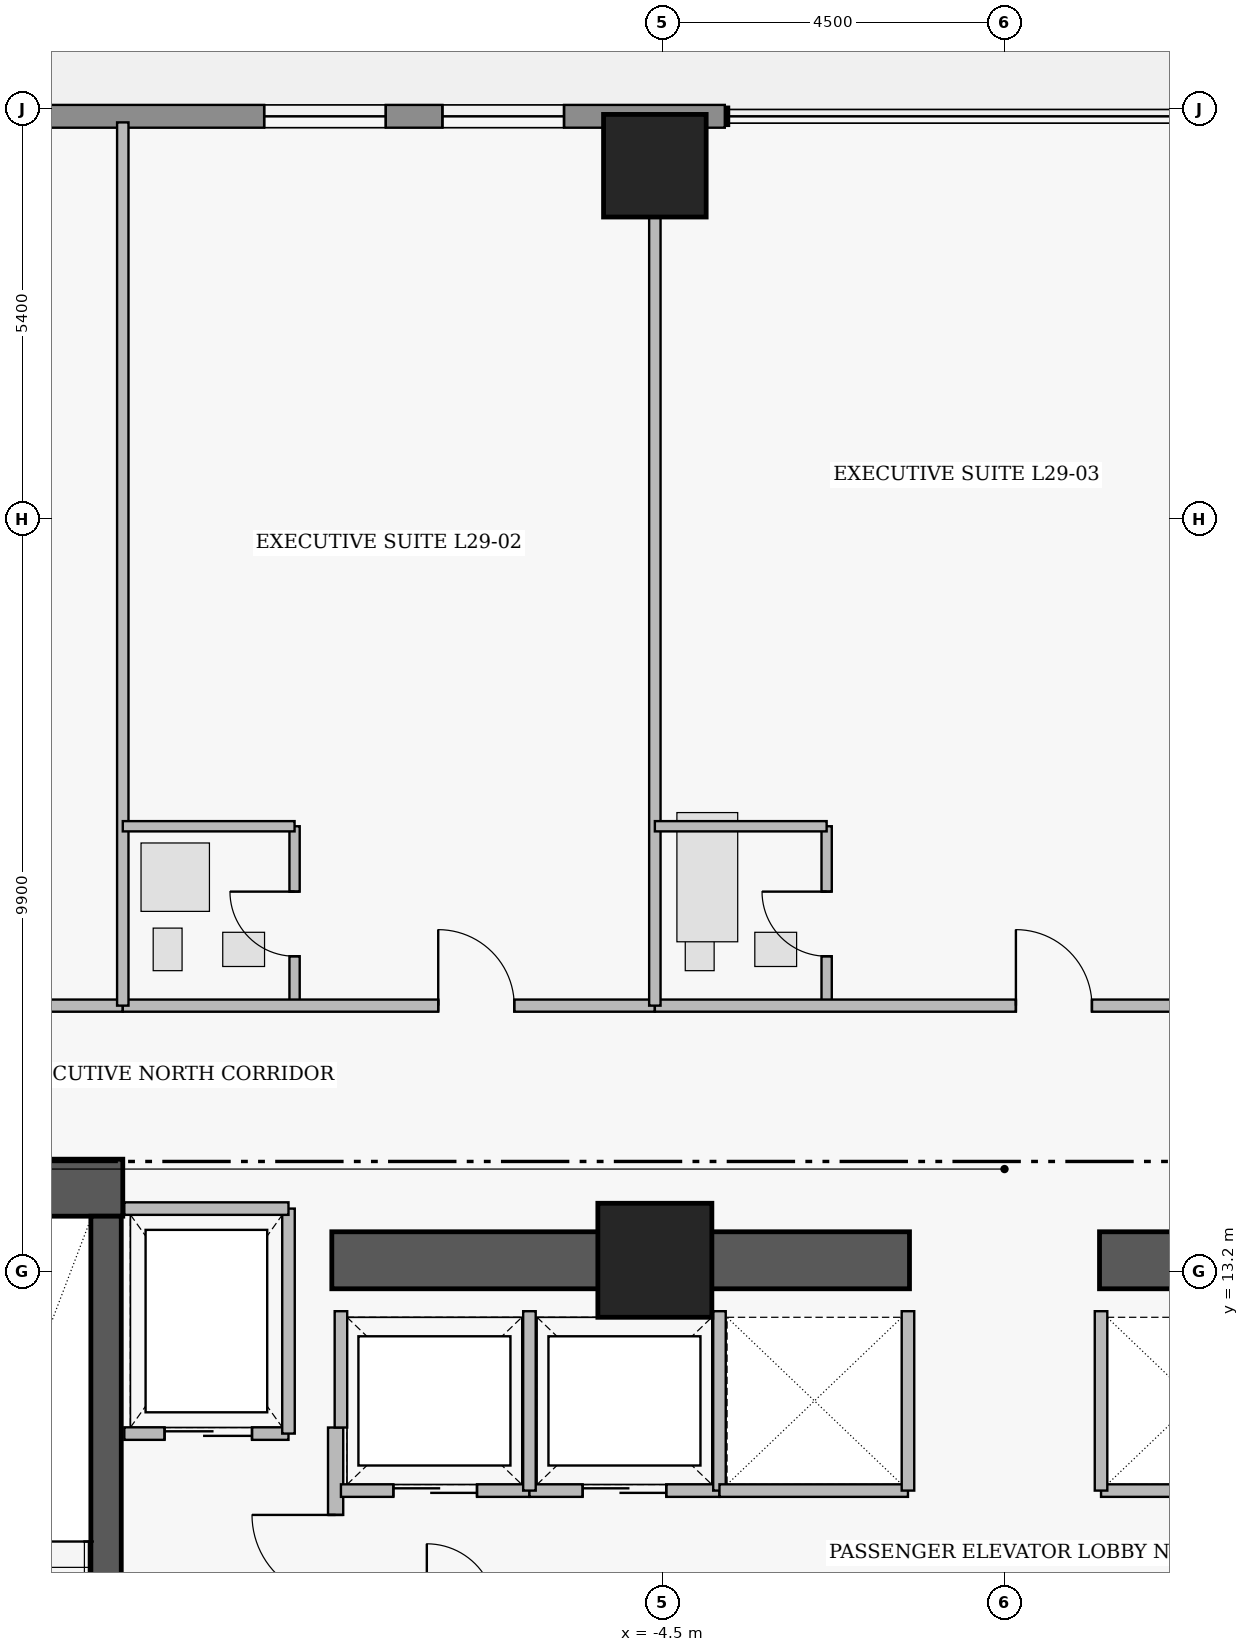
"""IFC4 building model, lengths in metres.
Left out: names, types, materials, properties, quantities, classifications, styles, units other than length and angle.
Written with IfcOpenShell. Run it as: python <this file> out.ifc"""

import sys

from ifc_helpers import new_model, si_unit, direction, frame, frame_2d, origin, origin_2d, place, context, subcontext, project, spatial, rectangle, extrude, element, fill, save


model = new_model("IFC4")
c1 = context("Model", 3, precision=1e-05, world=origin(), true_north=direction((0.0, 1.0)))
c2 = subcontext(c1, "Body", "Model", "MODEL_VIEW")
j1 = project(units=[si_unit("LENGTHUNIT", "METRE"), si_unit("PLANEANGLEUNIT", "RADIAN")], contexts=[c1])
p1 = place(None, origin())
s1 = spatial("IfcSite", under=j1, at=p1, CompositionType="ELEMENT")
p2 = place(p1, origin())
s2 = spatial("IfcBuilding", under=s1, at=p2, CompositionType="ELEMENT")
p3 = place(p2, frame((0.0, 0.0, 117.55)))
s3 = spatial("IfcBuildingStorey", under=s2, at=p3, CompositionType="ELEMENT", Elevation=117.55)
p4 = place(p3, frame((-16.16, 14.305, 0.0), z_axis=(0.0, 0.0, 1.0), x_axis=(1.0, 0.0, 0.0)))
e1 = element("IfcWall", 1, at=p4, inside=s3, PredefinedType="SHEAR", context=c2, shape_type="SweptSolid", body=[
    extrude(rectangle(XDim=4.56, YDim=0.75, at=frame_2d((2.28, 0.0))), origin(), (0.0, 0.0, 1.0), 3.46),
])
for number, where, z_axis, x_axis in (
    (2, (-8.85, 13.35, 0.0), (0.0, 0.0, 1.0), (1.0, 0.0, 0.0)),
    (3, (1.25, 13.35, 0.0), (0.0, 0.0, 1.0), (1.0, 0.0, 0.0)),
):
    element("IfcWall", number, at=place(p3, frame(where, z_axis=z_axis, x_axis=x_axis)), inside=s3, PredefinedType="SHEAR", context=c2, shape_type="SweptSolid", body=[
        extrude(rectangle(XDim=7.6, YDim=0.75, at=frame_2d((3.8, 0.0))), origin(), (0.0, 0.0, 1.0), 3.43),
    ])
p5 = place(p3, frame((-11.82, 4.97, 0.0), z_axis=(0.0, 0.0, 1.0), x_axis=(0.0, 1.0, 0.0)))
e4 = element("IfcWall", 4, at=p5, inside=s3, PredefinedType="SHEAR", context=c2, shape_type="SweptSolid", body=[
    extrude(rectangle(XDim=8.96, YDim=0.4, at=frame_2d((4.48, 0.0))), origin(), (0.0, 0.0, 1.0), 3.46),
])
p6 = place(p5, frame((0.31, 0.0, 0.0)))
e5 = element("IfcOpeningElement", 5, at=p6, cuts=e4, PredefinedType="OPENING", context=c2, shape_type="SweptSolid", body=[
    extrude(rectangle(XDim=1.12, YDim=2.22, at=frame_2d((0.56, 1.11))), frame((0.0, 0.21, 0.0), z_axis=(0.0, -1.0, 0.0), x_axis=(1.0, 0.0, 0.0)), (0.0, 0.0, 1.0), 0.42),
])
p7 = place(p3, frame((-4.6, 13.35, 0.0), z_axis=(0.0, 0.0, 1.0), x_axis=(1.0, 0.0, 0.0)))
e6 = element("IfcColumn", 6, at=p7, inside=s3, PredefinedType="COLUMN", context=c2, shape_type="SweptSolid", body=[
    extrude(rectangle(XDim=1.5, YDim=1.5, at=origin_2d()), origin(), (0.0, 0.0, 1.0), 3.65),
])
p8 = place(p3, frame((-4.6, 27.75, 0.0), z_axis=(0.0, 0.0, 1.0), x_axis=(1.0, 0.0, 0.0)))
e7 = element("IfcColumn", 7, at=p8, inside=s3, PredefinedType="COLUMN", context=c2, shape_type="SweptSolid", body=[
    extrude(rectangle(XDim=1.35, YDim=1.35, at=origin_2d()), origin(), (0.0, 0.0, 1.0), 3.65),
])
p9 = place(p3, frame((-14.72, 28.4, 0.0), z_axis=(0.0, 0.0, 1.0), x_axis=(1.0, 0.0, 0.0)))
e8 = element("IfcWall", 8, at=p9, inside=s3, PredefinedType="STANDARD", context=c2, shape_type="SweptSolid", body=[
    extrude(rectangle(XDim=11.04, YDim=0.3, at=frame_2d((5.52, 0.0))), origin(), (0.0, 0.0, 1.0), 3.43),
])
p10 = place(p9, frame((4.98, 0.0, 0.85)))
e9 = element("IfcOpeningElement", 9, at=p10, cuts=e8, PredefinedType="OPENING", context=c2, shape_type="SweptSolid", body=[
    extrude(rectangle(XDim=1.6, YDim=1.8, at=frame_2d((0.8, 0.9))), frame((0.0, 0.16, 0.0), z_axis=(0.0, -1.0, 0.0), x_axis=(1.0, 0.0, 0.0)), (0.0, 0.0, 1.0), 0.32),
])
p11 = place(p9, frame((7.325, 0.0, 0.85)))
e10 = element("IfcOpeningElement", 10, at=p11, cuts=e8, PredefinedType="OPENING", context=c2, shape_type="SweptSolid", body=[
    extrude(rectangle(XDim=1.6, YDim=1.8, at=frame_2d((0.8, 0.9))), frame((0.0, 0.16, 0.0), z_axis=(0.0, -1.0, 0.0), x_axis=(1.0, 0.0, 0.0)), (0.0, 0.0, 1.0), 0.32),
])
p12 = place(p3, frame((-8.8, 5.05, 0.0), z_axis=(0.0, 0.0, 1.0), x_axis=(0.0, 1.0, 0.0)))
e11 = element("IfcWall", 11, at=p12, inside=s3, PredefinedType="PARTITIONING", context=c2, shape_type="SweptSolid", body=[
    extrude(rectangle(XDim=6.1, YDim=0.2, at=frame_2d((3.05, 0.0))), origin(), (0.0, 0.0, 1.0), 3.43),
])
p13 = place(p12, frame((0.25, 0.0, 0.0)))
e12 = element("IfcOpeningElement", 12, at=p13, cuts=e11, PredefinedType="OPENING", context=c2, shape_type="SweptSolid", body=[
    extrude(rectangle(XDim=1.1, YDim=2.2, at=frame_2d((0.55, 1.1))), frame((0.0, 0.11, 0.0), z_axis=(0.0, -1.0, 0.0), x_axis=(1.0, 0.0, 0.0)), (0.0, 0.0, 1.0), 0.22),
])
p14 = place(p12, frame((3.85, 0.0, 0.0)))
e13 = element("IfcOpeningElement", 13, at=p14, cuts=e11, PredefinedType="OPENING", context=c2, shape_type="SweptSolid", body=[
    extrude(rectangle(XDim=1.1, YDim=2.2, at=frame_2d((0.55, 1.1))), frame((0.0, 0.11, 0.0), z_axis=(0.0, -1.0, 0.0), x_axis=(1.0, 0.0, 0.0)), (0.0, 0.0, 1.0), 0.22),
])
p15 = place(p3, frame((-11.58, 11.07, 0.0), z_axis=(0.0, 0.0, 1.0), x_axis=(1.0, 0.0, 0.0)))
e14 = element("IfcWall", 14, at=p15, inside=s3, PredefinedType="PARTITIONING", context=c2, shape_type="SweptSolid", body=[
    extrude(rectangle(XDim=2.16, YDim=0.165, at=frame_2d((1.08, 0.0))), origin(), (0.0, 0.0, 1.0), 3.43),
])
p16 = place(p15, frame((0.53, 0.0, 0.0)))
e15 = element("IfcOpeningElement", 15, at=p16, cuts=e14, PredefinedType="OPENING", context=c2, shape_type="SweptSolid", body=[
    extrude(rectangle(XDim=1.15, YDim=2.25, at=frame_2d((0.575, 1.125))), frame((0.0, 0.093, 0.0), z_axis=(0.0, -1.0, 0.0), x_axis=(1.0, 0.0, 0.0)), (0.0, 0.0, 1.0), 0.185),
])
p17 = place(p3, frame((-8.73, 10.32, 0.0), z_axis=(0.0, 0.0, 1.0), x_axis=(1.0, 0.0, 0.0)))
e16 = element("IfcWall", 16, at=p17, inside=s3, PredefinedType="PARTITIONING", context=c2, shape_type="SweptSolid", body=[
    extrude(rectangle(XDim=2.48, YDim=0.165, at=frame_2d((1.24, 0.0))), origin(), (0.0, 0.0, 1.0), 3.43),
])
p18 = place(p17, frame((0.69, 0.0, 0.0)))
e17 = element("IfcOpeningElement", 17, at=p18, cuts=e16, PredefinedType="OPENING", context=c2, shape_type="SweptSolid", body=[
    extrude(rectangle(XDim=1.1, YDim=2.25, at=frame_2d((0.55, 1.125))), frame((0.0, 0.093, 0.0), z_axis=(0.0, -1.0, 0.0), x_axis=(1.0, 0.0, 0.0)), (0.0, 0.0, 1.0), 0.185),
])
p19 = place(p3, frame((-6.25, 10.32, 0.0), z_axis=(0.0, 0.0, 1.0), x_axis=(1.0, 0.0, 0.0)))
e18 = element("IfcWall", 18, at=p19, inside=s3, PredefinedType="PARTITIONING", context=c2, shape_type="SweptSolid", body=[
    extrude(rectangle(XDim=2.5, YDim=0.165, at=frame_2d((1.25, 0.0))), origin(), (0.0, 0.0, 1.0), 3.43),
])
p20 = place(p19, frame((0.7, 0.0, 0.0)))
e19 = element("IfcOpeningElement", 19, at=p20, cuts=e18, PredefinedType="OPENING", context=c2, shape_type="SweptSolid", body=[
    extrude(rectangle(XDim=1.1, YDim=2.25, at=frame_2d((0.55, 1.125))), frame((0.0, 0.093, 0.0), z_axis=(0.0, -1.0, 0.0), x_axis=(1.0, 0.0, 0.0)), (0.0, 0.0, 1.0), 0.185),
])
p21 = place(p3, frame((-20.6, 16.7, 0.0), z_axis=(0.0, 0.0, 1.0), x_axis=(1.0, 0.0, 0.0)))
e20 = element("IfcWall", 20, at=p21, inside=s3, PredefinedType="PARTITIONING", context=c2, shape_type="SweptSolid", body=[
    extrude(rectangle(XDim=9.0, YDim=0.16, at=frame_2d((4.5, 0.0))), origin(), (0.0, 0.0, 1.0), 2.973),
])
p22 = place(p21, frame((5.15, 0.0, 0.0)))
e21 = element("IfcOpeningElement", 21, at=p22, cuts=e20, PredefinedType="OPENING", context=c2, shape_type="SweptSolid", body=[
    extrude(rectangle(XDim=1.0, YDim=2.15, at=frame_2d((0.5, 1.075))), frame((0.0, 0.09, 0.0), z_axis=(0.0, -1.0, 0.0), x_axis=(1.0, 0.0, 0.0)), (0.0, 0.0, 1.0), 0.18),
])
p23 = place(p3, frame((-9.34, 16.7, 0.0), z_axis=(0.0, 0.0, 1.0), x_axis=(0.0, 1.0, 0.0)))
e22 = element("IfcWall", 22, at=p23, inside=s3, PredefinedType="PLUMBINGWALL", context=c2, shape_type="SweptSolid", body=[
    extrude(rectangle(XDim=2.36, YDim=0.135, at=frame_2d((1.18, 0.0))), origin(), (0.0, 0.0, 1.0), 3.43),
])
p24 = place(p23, frame((0.65, 0.0, 0.0)))
e23 = element("IfcOpeningElement", 23, at=p24, cuts=e22, PredefinedType="OPENING", context=c2, shape_type="SweptSolid", body=[
    extrude(rectangle(XDim=0.85, YDim=2.1, at=frame_2d((0.425, 1.05))), frame((0.0, 0.077, 0.0), z_axis=(0.0, -1.0, 0.0), x_axis=(1.0, 0.0, 0.0)), (0.0, 0.0, 1.0), 0.155),
])
p25 = place(p3, frame((-11.6, 16.7, 0.0), z_axis=(0.0, 0.0, 1.0), x_axis=(1.0, 0.0, 0.0)))
e24 = element("IfcWall", 24, at=p25, inside=s3, PredefinedType="PARTITIONING", context=c2, shape_type="SweptSolid", body=[
    extrude(rectangle(XDim=7.0, YDim=0.16, at=frame_2d((3.5, 0.0))), origin(), (0.0, 0.0, 1.0), 2.973),
])
p26 = place(p25, frame((4.15, 0.0, 0.0)))
e25 = element("IfcOpeningElement", 25, at=p26, cuts=e24, PredefinedType="OPENING", context=c2, shape_type="SweptSolid", body=[
    extrude(rectangle(XDim=1.0, YDim=2.15, at=frame_2d((0.5, 1.075))), frame((0.0, 0.09, 0.0), z_axis=(0.0, -1.0, 0.0), x_axis=(1.0, 0.0, 0.0)), (0.0, 0.0, 1.0), 0.18),
])
p27 = place(p3, frame((-2.34, 16.7, 0.0), z_axis=(0.0, 0.0, 1.0), x_axis=(0.0, 1.0, 0.0)))
e26 = element("IfcWall", 26, at=p27, inside=s3, PredefinedType="PLUMBINGWALL", context=c2, shape_type="SweptSolid", body=[
    extrude(rectangle(XDim=2.36, YDim=0.135, at=frame_2d((1.18, 0.0))), origin(), (0.0, 0.0, 1.0), 3.43),
])
p28 = place(p27, frame((0.65, 0.0, 0.0)))
e27 = element("IfcOpeningElement", 27, at=p28, cuts=e26, PredefinedType="OPENING", context=c2, shape_type="SweptSolid", body=[
    extrude(rectangle(XDim=0.85, YDim=2.1, at=frame_2d((0.425, 1.05))), frame((0.0, 0.077, 0.0), z_axis=(0.0, -1.0, 0.0), x_axis=(1.0, 0.0, 0.0)), (0.0, 0.0, 1.0), 0.155),
])
p29 = place(p3, frame((-4.6, 16.7, 0.0), z_axis=(0.0, 0.0, 1.0), x_axis=(1.0, 0.0, 0.0)))
e28 = element("IfcWall", 28, at=p29, inside=s3, PredefinedType="PARTITIONING", context=c2, shape_type="SweptSolid", body=[
    extrude(rectangle(XDim=8.2, YDim=0.16, at=frame_2d((4.1, 0.0))), origin(), (0.0, 0.0, 1.0), 2.973),
])
p30 = place(p29, frame((4.75, 0.0, 0.0)))
e29 = element("IfcOpeningElement", 29, at=p30, cuts=e28, PredefinedType="OPENING", context=c2, shape_type="SweptSolid", body=[
    extrude(rectangle(XDim=1.0, YDim=2.15, at=frame_2d((0.5, 1.075))), frame((0.0, 0.09, 0.0), z_axis=(0.0, -1.0, 0.0), x_axis=(1.0, 0.0, 0.0)), (0.0, 0.0, 1.0), 0.18),
])
p31 = place(p3, frame((-9.42, 11.07, 0.0), z_axis=(0.0, 0.0, 1.0), x_axis=(0.0, 1.0, 0.0)))
e30 = element("IfcWall", 30, at=p31, inside=s3, PredefinedType="PARTITIONING", context=c2, shape_type="SweptSolid", body=[
    extrude(rectangle(XDim=2.96, YDim=0.165, at=frame_2d((1.48, 0.0))), origin(), (0.0, 0.0, 1.0), 3.43),
])
p32 = place(p3, frame((-11.58, 14.03, 0.0), z_axis=(0.0, 0.0, 1.0), x_axis=(1.0, 0.0, 0.0)))
e31 = element("IfcWall", 31, at=p32, inside=s3, PredefinedType="PARTITIONING", context=c2, shape_type="SweptSolid", body=[
    extrude(rectangle(XDim=2.16, YDim=0.165, at=frame_2d((1.08, 0.0))), origin(), (0.0, 0.0, 1.0), 3.43),
])
p33 = place(p3, frame((-8.73, 11.15, 0.0), z_axis=(0.0, 0.0, 1.0), x_axis=(0.0, 1.0, 0.0)))
e32 = element("IfcWall", 32, at=p33, inside=s3, PredefinedType="PARTITIONING", context=c2, shape_type="SweptSolid", body=[
    extrude(rectangle(XDim=1.53, YDim=0.165, at=frame_2d((0.765, 0.0))), origin(), (0.0, 0.0, 1.0), 3.43),
])
for number, where, z_axis, x_axis in (
    (33, (-6.25, 10.32, 0.0), (0.0, 0.0, 1.0), (0.0, 1.0, 0.0)),
    (34, (-3.75, 10.32, 0.0), (0.0, 0.0, 1.0), (0.0, 1.0, 0.0)),
):
    element("IfcWall", number, at=place(p3, frame(where, z_axis=z_axis, x_axis=x_axis)), inside=s3, PredefinedType="PARTITIONING", context=c2, shape_type="SweptSolid", body=[
        extrude(rectangle(XDim=2.36, YDim=0.165, at=frame_2d((1.18, 0.0))), origin(), (0.0, 0.0, 1.0), 3.43),
    ])
p34 = place(p3, frame((-3.75, 10.32, 0.0), z_axis=(0.0, 0.0, 1.0), x_axis=(1.0, 0.0, 0.0)))
e35 = element("IfcWall", 35, at=p34, inside=s3, PredefinedType="PARTITIONING", context=c2, shape_type="SweptSolid", body=[
    extrude(rectangle(XDim=2.48, YDim=0.165, at=frame_2d((1.24, 0.0))), origin(), (0.0, 0.0, 1.0), 3.43),
])
p35 = place(p3, frame((-1.27, 10.32, 0.0), z_axis=(0.0, 0.0, 1.0), x_axis=(0.0, 1.0, 0.0)))
e36 = element("IfcWall", 36, at=p35, inside=s3, PredefinedType="PARTITIONING", context=c2, shape_type="SweptSolid", body=[
    extrude(rectangle(XDim=2.36, YDim=0.165, at=frame_2d((1.18, 0.0))), origin(), (0.0, 0.0, 1.0), 3.43),
])
p36 = place(p3, frame((1.27, 10.32, 0.0), z_axis=(0.0, 0.0, 1.0), x_axis=(1.0, 0.0, 0.0)))
e37 = element("IfcWall", 37, at=p36, inside=s3, PredefinedType="PARTITIONING", context=c2, shape_type="SweptSolid", body=[
    extrude(rectangle(XDim=2.48, YDim=0.165, at=frame_2d((1.24, 0.0))), origin(), (0.0, 0.0, 1.0), 3.43),
])
p37 = place(p3, frame((1.27, 10.32, 0.0), z_axis=(0.0, 0.0, 1.0), x_axis=(0.0, 1.0, 0.0)))
e38 = element("IfcWall", 38, at=p37, inside=s3, PredefinedType="PARTITIONING", context=c2, shape_type="SweptSolid", body=[
    extrude(rectangle(XDim=2.36, YDim=0.165, at=frame_2d((1.18, 0.0))), origin(), (0.0, 0.0, 1.0), 3.43),
])
p38 = place(p3, frame((-11.6, 16.7, 0.0), z_axis=(0.0, 0.0, 1.0), x_axis=(0.0, 1.0, 0.0)))
e39 = element("IfcWall", 39, at=p38, inside=s3, PredefinedType="PARTITIONING", context=c2, shape_type="SweptSolid", body=[
    extrude(rectangle(XDim=11.62, YDim=0.15, at=frame_2d((5.81, 0.0))), origin(), (0.0, 0.0, 1.0), 3.43),
])
p39 = place(p3, frame((-11.6, 19.06, 0.0), z_axis=(0.0, 0.0, 1.0), x_axis=(1.0, 0.0, 0.0)))
e40 = element("IfcWall", 40, at=p39, inside=s3, PredefinedType="PLUMBINGWALL", context=c2, shape_type="SweptSolid", body=[
    extrude(rectangle(XDim=2.26, YDim=0.135, at=frame_2d((1.13, 0.0))), origin(), (0.0, 0.0, 1.0), 2.973),
])
p40 = place(p3, frame((-4.6, 16.7, 0.0), z_axis=(0.0, 0.0, 1.0), x_axis=(0.0, 1.0, 0.0)))
e41 = element("IfcWall", 41, at=p40, inside=s3, PredefinedType="PARTITIONING", context=c2, shape_type="SweptSolid", body=[
    extrude(rectangle(XDim=11.62, YDim=0.15, at=frame_2d((5.81, 0.0))), origin(), (0.0, 0.0, 1.0), 2.503),
])
p41 = place(p3, frame((-4.6, 19.06, 0.0), z_axis=(0.0, 0.0, 1.0), x_axis=(1.0, 0.0, 0.0)))
e42 = element("IfcWall", 42, at=p41, inside=s3, PredefinedType="PLUMBINGWALL", context=c2, shape_type="SweptSolid", body=[
    extrude(rectangle(XDim=2.26, YDim=0.135, at=frame_2d((1.13, 0.0))), origin(), (0.0, 0.0, 1.0), 2.973),
])
p42 = place(p10, origin())
e43 = element("IfcWindow", 43, at=p42, inside=s3, PartitioningType="SINGLE_PANEL", PredefinedType="WINDOW", context=c2, shape_type="SweptSolid", body=[
    extrude(rectangle(XDim=1.6, YDim=1.8, at=frame_2d((0.8, 0.9))), frame((0.0, 0.03, 0.0), z_axis=(0.0, -1.0, 0.0), x_axis=(1.0, 0.0, 0.0)), (0.0, 0.0, 1.0), 0.06),
])
fill(e9, e43)
p43 = place(p11, origin())
e44 = element("IfcWindow", 44, at=p43, inside=s3, PartitioningType="SINGLE_PANEL", PredefinedType="WINDOW", context=c2, shape_type="SweptSolid", body=[
    extrude(rectangle(XDim=1.6, YDim=1.8, at=frame_2d((0.8, 0.9))), frame((0.0, 0.03, 0.0), z_axis=(0.0, -1.0, 0.0), x_axis=(1.0, 0.0, 0.0)), (0.0, 0.0, 1.0), 0.06),
])
fill(e10, e44)
p44 = place(p14, origin())
e45 = element("IfcDoor", 45, at=p44, inside=s3, OperationType="SINGLE_SWING_RIGHT", PredefinedType="DOOR", context=c2, shape_type="SweptSolid", body=[
    extrude(rectangle(XDim=1.1, YDim=2.2, at=frame_2d((0.55, 1.1))), frame((0.0, 0.025, 0.0), z_axis=(0.0, -1.0, 0.0), x_axis=(1.0, 0.0, 0.0)), (0.0, 0.0, 1.0), 0.05),
])
fill(e13, e45)
p45 = place(p16, origin())
e46 = element("IfcDoor", 46, at=p45, inside=s3, OperationType="SLIDING_TO_LEFT", PredefinedType="DOOR", context=c2, shape_type="SweptSolid", body=[
    extrude(rectangle(XDim=1.15, YDim=2.25, at=frame_2d((0.575, 1.125))), frame((0.0, 0.025, 0.0), z_axis=(0.0, -1.0, 0.0), x_axis=(1.0, 0.0, 0.0)), (0.0, 0.0, 1.0), 0.05),
])
fill(e15, e46)
p46 = place(p18, origin())
e47 = element("IfcDoor", 47, at=p46, inside=s3, OperationType="SLIDING_TO_LEFT", PredefinedType="DOOR", context=c2, shape_type="SweptSolid", body=[
    extrude(rectangle(XDim=1.1, YDim=2.25, at=frame_2d((0.55, 1.125))), frame((0.0, 0.025, 0.0), z_axis=(0.0, -1.0, 0.0), x_axis=(1.0, 0.0, 0.0)), (0.0, 0.0, 1.0), 0.05),
])
fill(e17, e47)
p47 = place(p20, origin())
e48 = element("IfcDoor", 48, at=p47, inside=s3, OperationType="SLIDING_TO_LEFT", PredefinedType="DOOR", context=c2, shape_type="SweptSolid", body=[
    extrude(rectangle(XDim=1.1, YDim=2.25, at=frame_2d((0.55, 1.125))), frame((0.0, 0.025, 0.0), z_axis=(0.0, -1.0, 0.0), x_axis=(1.0, 0.0, 0.0)), (0.0, 0.0, 1.0), 0.05),
])
fill(e19, e48)
p48 = place(p24, origin())
e49 = element("IfcDoor", 49, at=p48, inside=s3, OperationType="SINGLE_SWING_RIGHT", PredefinedType="DOOR", context=c2, shape_type="SweptSolid", body=[
    extrude(rectangle(XDim=0.85, YDim=2.1, at=frame_2d((0.425, 1.05))), frame((0.0, 0.025, 0.0), z_axis=(0.0, -1.0, 0.0), x_axis=(1.0, 0.0, 0.0)), (0.0, 0.0, 1.0), 0.05),
])
fill(e23, e49)
p49 = place(p26, origin())
e50 = element("IfcDoor", 50, at=p49, inside=s3, OperationType="SINGLE_SWING_LEFT", PredefinedType="DOOR", context=c2, shape_type="SweptSolid", body=[
    extrude(rectangle(XDim=1.0, YDim=2.15, at=frame_2d((0.5, 1.075))), frame((0.0, 0.025, 0.0), z_axis=(0.0, -1.0, 0.0), x_axis=(1.0, 0.0, 0.0)), (0.0, 0.0, 1.0), 0.05),
])
fill(e25, e50)
p50 = place(p28, origin())
e51 = element("IfcDoor", 51, at=p50, inside=s3, OperationType="SINGLE_SWING_RIGHT", PredefinedType="DOOR", context=c2, shape_type="SweptSolid", body=[
    extrude(rectangle(XDim=0.85, YDim=2.1, at=frame_2d((0.425, 1.05))), frame((0.0, 0.025, 0.0), z_axis=(0.0, -1.0, 0.0), x_axis=(1.0, 0.0, 0.0)), (0.0, 0.0, 1.0), 0.05),
])
fill(e27, e51)
p51 = place(p30, origin())
e52 = element("IfcDoor", 52, at=p51, inside=s3, OperationType="SINGLE_SWING_LEFT", PredefinedType="DOOR", context=c2, shape_type="SweptSolid", body=[
    extrude(rectangle(XDim=1.0, YDim=2.15, at=frame_2d((0.5, 1.075))), frame((0.0, 0.025, 0.0), z_axis=(0.0, -1.0, 0.0), x_axis=(1.0, 0.0, 0.0)), (0.0, 0.0, 1.0), 0.05),
])
fill(e29, e52)
save(model, sys.argv[1])
